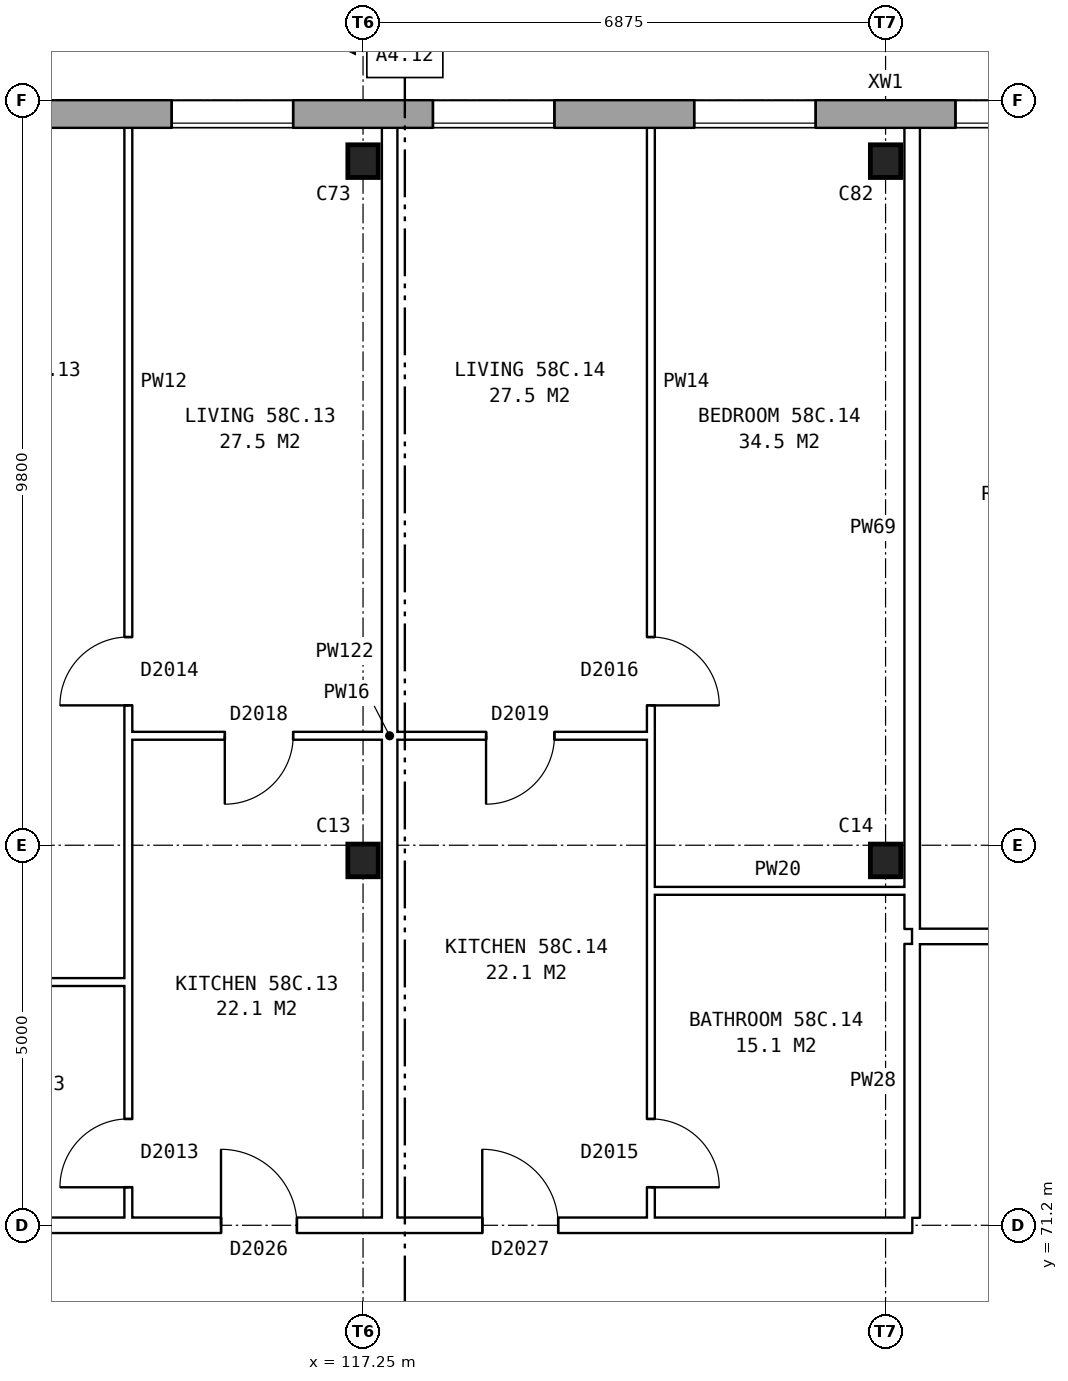
"""IFC4 building model, lengths in metres.
Left out: names, types, materials, properties, quantities, classifications, styles, units other than length and angle.
Written with IfcOpenShell. Run it as: python <this file> out.ifc"""

import sys

from ifc_helpers import new_model, si_unit, direction, frame, frame_2d, origin, origin_2d, place, context, subcontext, project, spatial, rectangle, i_section, extrude, element, fill, save


model = new_model("IFC4")
c1 = context("Model", 3, precision=1e-05, world=origin(), true_north=direction((0.0, 1.0)))
c2 = subcontext(c1, "Body", "Model", "MODEL_VIEW")
j1 = project(units=[si_unit("LENGTHUNIT", "METRE"), si_unit("PLANEANGLEUNIT", "RADIAN")], contexts=[c1])
p1 = place(None, origin())
s1 = spatial("IfcSite", under=j1, at=p1, CompositionType="ELEMENT")
p2 = place(p1, origin())
s2 = spatial("IfcBuilding", under=s1, at=p2, CompositionType="ELEMENT")
p3 = place(p2, frame((0.0, 0.0, 205.9)))
s3 = spatial("IfcBuildingStorey", under=s2, at=p3, CompositionType="ELEMENT", Elevation=205.9)
for number, where, z_axis, x_axis in (
    (1, (117.25, 76.0, 0.0), (0.0, 0.0, 1.0), (1.0, 0.0, 0.0)),
    (2, (124.125, 76.0, 0.0), (0.0, 0.0, 1.0), (1.0, 0.0, 0.0)),
    (3, (117.25, 85.2, 0.0), (0.0, 0.0, 1.0), (1.0, 0.0, 0.0)),
    (4, (124.125, 85.2, 0.0), (0.0, 0.0, 1.0), (1.0, 0.0, 0.0)),
):
    element("IfcColumn", number, at=place(p3, frame(where, z_axis=z_axis, x_axis=x_axis)), inside=s3, PredefinedType="COLUMN", context=c2, shape_type="SweptSolid", body=[
        extrude(i_section(OverallWidth=0.4, OverallDepth=0.43, WebThickness=0.04, FlangeThickness=0.04, at=origin_2d()), origin(), (0.0, 0.0, 1.0), 2.85),
    ])
p4 = place(p3, frame((131.05, 85.82, 0.0), z_axis=(0.0, 0.0, 1.0), x_axis=(-1.0, 0.0, 0.0)))
e5 = element("IfcWall", 5, at=p4, inside=s3, PredefinedType="STANDARD", context=c2, shape_type="SweptSolid", body=[
    extrude(rectangle(XDim=55.1, YDim=0.36, at=frame_2d((27.55, 0.0))), origin(), (0.0, 0.0, 1.0), 2.85),
])
p5 = place(p4, frame((0.969, 0.0, 0.8)))
e6 = element("IfcOpeningElement", 6, at=p5, cuts=e5, PredefinedType="OPENING", context=c2, shape_type="SweptSolid", body=[
    extrude(rectangle(XDim=1.6, YDim=1.8, at=frame_2d((0.8, 0.9))), frame((0.0, 0.19, 0.0), z_axis=(0.0, -1.0, 0.0), x_axis=(1.0, 0.0, 0.0)), (0.0, 0.0, 1.0), 0.38),
])
p6 = place(p4, frame((4.406, 0.0, 0.8)))
e7 = element("IfcOpeningElement", 7, at=p6, cuts=e5, PredefinedType="OPENING", context=c2, shape_type="SweptSolid", body=[
    extrude(rectangle(XDim=1.6, YDim=1.8, at=frame_2d((0.8, 0.9))), frame((0.0, 0.19, 0.0), z_axis=(0.0, -1.0, 0.0), x_axis=(1.0, 0.0, 0.0)), (0.0, 0.0, 1.0), 0.38),
])
p7 = place(p4, frame((7.844, 0.0, 0.8)))
e8 = element("IfcOpeningElement", 8, at=p7, cuts=e5, PredefinedType="OPENING", context=c2, shape_type="SweptSolid", body=[
    extrude(rectangle(XDim=1.6, YDim=1.8, at=frame_2d((0.8, 0.9))), frame((0.0, 0.19, 0.0), z_axis=(0.0, -1.0, 0.0), x_axis=(1.0, 0.0, 0.0)), (0.0, 0.0, 1.0), 0.38),
])
p8 = place(p4, frame((11.281, 0.0, 0.8)))
e9 = element("IfcOpeningElement", 9, at=p8, cuts=e5, PredefinedType="OPENING", context=c2, shape_type="SweptSolid", body=[
    extrude(rectangle(XDim=1.6, YDim=1.8, at=frame_2d((0.8, 0.9))), frame((0.0, 0.19, 0.0), z_axis=(0.0, -1.0, 0.0), x_axis=(1.0, 0.0, 0.0)), (0.0, 0.0, 1.0), 0.38),
])
p9 = place(p4, frame((14.719, 0.0, 0.8)))
e10 = element("IfcOpeningElement", 10, at=p9, cuts=e5, PredefinedType="OPENING", context=c2, shape_type="SweptSolid", body=[
    extrude(rectangle(XDim=1.6, YDim=1.8, at=frame_2d((0.8, 0.9))), frame((0.0, 0.19, 0.0), z_axis=(0.0, -1.0, 0.0), x_axis=(1.0, 0.0, 0.0)), (0.0, 0.0, 1.0), 0.38),
])
p10 = place(p4, frame((18.156, 0.0, 0.8)))
e11 = element("IfcOpeningElement", 11, at=p10, cuts=e5, PredefinedType="OPENING", context=c2, shape_type="SweptSolid", body=[
    extrude(rectangle(XDim=1.6, YDim=1.8, at=frame_2d((0.8, 0.9))), frame((0.0, 0.19, 0.0), z_axis=(0.0, -1.0, 0.0), x_axis=(1.0, 0.0, 0.0)), (0.0, 0.0, 1.0), 0.38),
])
p11 = place(p4, frame((21.594, 0.0, 0.8)))
e12 = element("IfcOpeningElement", 12, at=p11, cuts=e5, PredefinedType="OPENING", context=c2, shape_type="SweptSolid", body=[
    extrude(rectangle(XDim=1.6, YDim=1.8, at=frame_2d((0.8, 0.9))), frame((0.0, 0.19, 0.0), z_axis=(0.0, -1.0, 0.0), x_axis=(1.0, 0.0, 0.0)), (0.0, 0.0, 1.0), 0.38),
])
p12 = place(p4, frame((25.031, 0.0, 0.8)))
e13 = element("IfcOpeningElement", 13, at=p12, cuts=e5, PredefinedType="OPENING", context=c2, shape_type="SweptSolid", body=[
    extrude(rectangle(XDim=1.6, YDim=1.8, at=frame_2d((0.8, 0.9))), frame((0.0, 0.19, 0.0), z_axis=(0.0, -1.0, 0.0), x_axis=(1.0, 0.0, 0.0)), (0.0, 0.0, 1.0), 0.38),
])
p13 = place(p4, frame((28.469, 0.0, 0.8)))
e14 = element("IfcOpeningElement", 14, at=p13, cuts=e5, PredefinedType="OPENING", context=c2, shape_type="SweptSolid", body=[
    extrude(rectangle(XDim=1.6, YDim=1.8, at=frame_2d((0.8, 0.9))), frame((0.0, 0.19, 0.0), z_axis=(0.0, -1.0, 0.0), x_axis=(1.0, 0.0, 0.0)), (0.0, 0.0, 1.0), 0.38),
])
p14 = place(p4, frame((31.906, 0.0, 0.8)))
e15 = element("IfcOpeningElement", 15, at=p14, cuts=e5, PredefinedType="OPENING", context=c2, shape_type="SweptSolid", body=[
    extrude(rectangle(XDim=1.6, YDim=1.8, at=frame_2d((0.8, 0.9))), frame((0.0, 0.19, 0.0), z_axis=(0.0, -1.0, 0.0), x_axis=(1.0, 0.0, 0.0)), (0.0, 0.0, 1.0), 0.38),
])
p15 = place(p4, frame((35.344, 0.0, 0.8)))
e16 = element("IfcOpeningElement", 16, at=p15, cuts=e5, PredefinedType="OPENING", context=c2, shape_type="SweptSolid", body=[
    extrude(rectangle(XDim=1.6, YDim=1.8, at=frame_2d((0.8, 0.9))), frame((0.0, 0.19, 0.0), z_axis=(0.0, -1.0, 0.0), x_axis=(1.0, 0.0, 0.0)), (0.0, 0.0, 1.0), 0.38),
])
p16 = place(p4, frame((38.781, 0.0, 0.8)))
e17 = element("IfcOpeningElement", 17, at=p16, cuts=e5, PredefinedType="OPENING", context=c2, shape_type="SweptSolid", body=[
    extrude(rectangle(XDim=1.6, YDim=1.8, at=frame_2d((0.8, 0.9))), frame((0.0, 0.19, 0.0), z_axis=(0.0, -1.0, 0.0), x_axis=(1.0, 0.0, 0.0)), (0.0, 0.0, 1.0), 0.38),
])
p17 = place(p4, frame((42.219, 0.0, 0.8)))
e18 = element("IfcOpeningElement", 18, at=p17, cuts=e5, PredefinedType="OPENING", context=c2, shape_type="SweptSolid", body=[
    extrude(rectangle(XDim=1.6, YDim=1.8, at=frame_2d((0.8, 0.9))), frame((0.0, 0.19, 0.0), z_axis=(0.0, -1.0, 0.0), x_axis=(1.0, 0.0, 0.0)), (0.0, 0.0, 1.0), 0.38),
])
p18 = place(p4, frame((45.656, 0.0, 0.8)))
e19 = element("IfcOpeningElement", 19, at=p18, cuts=e5, PredefinedType="OPENING", context=c2, shape_type="SweptSolid", body=[
    extrude(rectangle(XDim=1.6, YDim=1.8, at=frame_2d((0.8, 0.9))), frame((0.0, 0.19, 0.0), z_axis=(0.0, -1.0, 0.0), x_axis=(1.0, 0.0, 0.0)), (0.0, 0.0, 1.0), 0.38),
])
p19 = place(p4, frame((49.094, 0.0, 0.8)))
e20 = element("IfcOpeningElement", 20, at=p19, cuts=e5, PredefinedType="OPENING", context=c2, shape_type="SweptSolid", body=[
    extrude(rectangle(XDim=1.6, YDim=1.8, at=frame_2d((0.8, 0.9))), frame((0.0, 0.19, 0.0), z_axis=(0.0, -1.0, 0.0), x_axis=(1.0, 0.0, 0.0)), (0.0, 0.0, 1.0), 0.38),
])
p20 = place(p4, frame((52.531, 0.0, 0.8)))
e21 = element("IfcOpeningElement", 21, at=p20, cuts=e5, PredefinedType="OPENING", context=c2, shape_type="SweptSolid", body=[
    extrude(rectangle(XDim=1.6, YDim=1.8, at=frame_2d((0.8, 0.9))), frame((0.0, 0.19, 0.0), z_axis=(0.0, -1.0, 0.0), x_axis=(1.0, 0.0, 0.0)), (0.0, 0.0, 1.0), 0.38),
])
p21 = place(p3, frame((83.225, 71.2, 0.0), z_axis=(0.0, 0.0, 1.0), x_axis=(1.0, 0.0, 0.0)))
e22 = element("IfcWall", 22, at=p21, inside=s3, PredefinedType="PARTITIONING", context=c2, shape_type="SweptSolid", body=[
    extrude(rectangle(XDim=41.25, YDim=0.2, at=frame_2d((20.625, 0.0))), origin(), (0.0, 0.0, 1.0), 2.85),
])
p22 = place(p21, frame((4.656, 0.0, 0.0)))
e23 = element("IfcOpeningElement", 23, at=p22, cuts=e22, PredefinedType="OPENING", context=c2, shape_type="SweptSolid", body=[
    extrude(rectangle(XDim=1.0, YDim=2.1, at=frame_2d((0.5, 1.05))), frame((0.0, 0.11, 0.0), z_axis=(0.0, -1.0, 0.0), x_axis=(1.0, 0.0, 0.0)), (0.0, 0.0, 1.0), 0.22),
])
p23 = place(p21, frame((11.531, 0.0, 0.0)))
e24 = element("IfcOpeningElement", 24, at=p23, cuts=e22, PredefinedType="OPENING", context=c2, shape_type="SweptSolid", body=[
    extrude(rectangle(XDim=1.0, YDim=2.1, at=frame_2d((0.5, 1.05))), frame((0.0, 0.11, 0.0), z_axis=(0.0, -1.0, 0.0), x_axis=(1.0, 0.0, 0.0)), (0.0, 0.0, 1.0), 0.22),
])
p24 = place(p21, frame((21.844, 0.0, 0.0)))
e25 = element("IfcOpeningElement", 25, at=p24, cuts=e22, PredefinedType="OPENING", context=c2, shape_type="SweptSolid", body=[
    extrude(rectangle(XDim=1.0, YDim=2.1, at=frame_2d((0.5, 1.05))), frame((0.0, 0.11, 0.0), z_axis=(0.0, -1.0, 0.0), x_axis=(1.0, 0.0, 0.0)), (0.0, 0.0, 1.0), 0.22),
])
p25 = place(p21, frame((32.156, 0.0, 0.0)))
e26 = element("IfcOpeningElement", 26, at=p25, cuts=e22, PredefinedType="OPENING", context=c2, shape_type="SweptSolid", body=[
    extrude(rectangle(XDim=1.0, YDim=2.1, at=frame_2d((0.5, 1.05))), frame((0.0, 0.11, 0.0), z_axis=(0.0, -1.0, 0.0), x_axis=(1.0, 0.0, 0.0)), (0.0, 0.0, 1.0), 0.22),
])
p26 = place(p21, frame((35.594, 0.0, 0.0)))
e27 = element("IfcOpeningElement", 27, at=p26, cuts=e22, PredefinedType="OPENING", context=c2, shape_type="SweptSolid", body=[
    extrude(rectangle(XDim=1.0, YDim=2.1, at=frame_2d((0.5, 1.05))), frame((0.0, 0.11, 0.0), z_axis=(0.0, -1.0, 0.0), x_axis=(1.0, 0.0, 0.0)), (0.0, 0.0, 1.0), 0.22),
])
p27 = place(p3, frame((110.825, 74.4, 0.0), z_axis=(0.0, 0.0, 1.0), x_axis=(1.0, 0.0, 0.0)))
e28 = element("IfcWall", 28, at=p27, inside=s3, PredefinedType="PARTITIONING", context=c2, shape_type="SweptSolid", body=[
    extrude(rectangle(XDim=3.337, YDim=0.1, at=frame_2d((1.668, 0.0))), origin(), (0.0, 0.0, 1.0), 2.85),
])
p28 = place(p3, frame((124.475, 75.0, 0.0), z_axis=(0.0, 0.0, 1.0), x_axis=(1.0, 0.0, 0.0)))
e29 = element("IfcWall", 29, at=p28, inside=s3, PredefinedType="PARTITIONING", context=c2, shape_type="SweptSolid", body=[
    extrude(rectangle(XDim=6.885, YDim=0.2, at=frame_2d((3.442, 0.0))), origin(), (0.0, 0.0, 1.0), 2.85),
])
p29 = place(p28, frame((2.992, 0.0, 0.0)))
e30 = element("IfcOpeningElement", 30, at=p29, cuts=e29, PredefinedType="OPENING", context=c2, shape_type="SweptSolid", body=[
    extrude(rectangle(XDim=0.9, YDim=2.1, at=frame_2d((0.45, 1.05))), frame((0.0, 0.11, 0.0), z_axis=(0.0, -1.0, 0.0), x_axis=(1.0, 0.0, 0.0)), (0.0, 0.0, 1.0), 0.22),
])
p30 = place(p3, frame((121.037, 75.6, 0.0), z_axis=(0.0, 0.0, 1.0), x_axis=(1.0, 0.0, 0.0)))
e31 = element("IfcWall", 31, at=p30, inside=s3, PredefinedType="PARTITIONING", context=c2, shape_type="SweptSolid", body=[
    extrude(rectangle(XDim=3.338, YDim=0.1, at=frame_2d((1.669, 0.0))), origin(), (0.0, 0.0, 1.0), 2.85),
])
p31 = place(p3, frame((114.162, 77.64, 0.0), z_axis=(0.0, 0.0, 1.0), x_axis=(1.0, 0.0, 0.0)))
e32 = element("IfcWall", 32, at=p31, inside=s3, PredefinedType="PARTITIONING", context=c2, shape_type="SweptSolid", body=[
    extrude(rectangle(XDim=6.875, YDim=0.1, at=frame_2d((3.438, 0.0))), origin(), (0.0, 0.0, 1.0), 2.85),
])
p32 = place(p31, frame((1.269, 0.0, 0.0)))
e33 = element("IfcOpeningElement", 33, at=p32, cuts=e32, PredefinedType="OPENING", context=c2, shape_type="SweptSolid", body=[
    extrude(rectangle(XDim=0.9, YDim=2.1, at=frame_2d((0.45, 1.05))), frame((0.0, 0.06, 0.0), z_axis=(0.0, -1.0, 0.0), x_axis=(1.0, 0.0, 0.0)), (0.0, 0.0, 1.0), 0.12),
])
p33 = place(p31, frame((4.707, 0.0, 0.0)))
e34 = element("IfcOpeningElement", 34, at=p33, cuts=e32, PredefinedType="OPENING", context=c2, shape_type="SweptSolid", body=[
    extrude(rectangle(XDim=0.9, YDim=2.1, at=frame_2d((0.45, 1.05))), frame((0.0, 0.06, 0.0), z_axis=(0.0, -1.0, 0.0), x_axis=(1.0, 0.0, 0.0)), (0.0, 0.0, 1.0), 0.12),
])
p34 = place(p3, frame((114.162, 71.3, 0.0), z_axis=(0.0, 0.0, 1.0), x_axis=(0.0, 1.0, 0.0)))
e35 = element("IfcWall", 35, at=p34, inside=s3, PredefinedType="PARTITIONING", context=c2, shape_type="SweptSolid", body=[
    extrude(rectangle(XDim=14.34, YDim=0.1, at=frame_2d((7.17, 0.0))), origin(), (0.0, 0.0, 1.0), 2.85),
])
p35 = place(p34, frame((6.74, 0.0, 0.0)))
e36 = element("IfcOpeningElement", 36, at=p35, cuts=e35, PredefinedType="OPENING", context=c2, shape_type="SweptSolid", body=[
    extrude(rectangle(XDim=0.9, YDim=2.1, at=frame_2d((0.45, 1.05))), frame((0.0, 0.06, 0.0), z_axis=(0.0, -1.0, 0.0), x_axis=(1.0, 0.0, 0.0)), (0.0, 0.0, 1.0), 0.12),
])
p36 = place(p34, frame((0.4, 0.0, 0.0)))
e37 = element("IfcOpeningElement", 37, at=p36, cuts=e35, PredefinedType="OPENING", context=c2, shape_type="SweptSolid", body=[
    extrude(rectangle(XDim=0.9, YDim=2.1, at=frame_2d((0.45, 1.05))), frame((0.0, 0.06, 0.0), z_axis=(0.0, -1.0, 0.0), x_axis=(1.0, 0.0, 0.0)), (0.0, 0.0, 1.0), 0.12),
])
p37 = place(p3, frame((117.6, 71.3, 0.0), z_axis=(0.0, 0.0, 1.0), x_axis=(0.0, 1.0, 0.0)))
e38 = element("IfcWall", 38, at=p37, inside=s3, PredefinedType="PARTITIONING", context=c2, shape_type="SweptSolid", body=[
    extrude(rectangle(XDim=14.34, YDim=0.2, at=frame_2d((7.17, 0.0))), origin(), (0.0, 0.0, 1.0), 2.85),
])
p38 = place(p3, frame((121.037, 71.3, 0.0), z_axis=(0.0, 0.0, 1.0), x_axis=(0.0, 1.0, 0.0)))
e39 = element("IfcWall", 39, at=p38, inside=s3, PredefinedType="PARTITIONING", context=c2, shape_type="SweptSolid", body=[
    extrude(rectangle(XDim=14.34, YDim=0.1, at=frame_2d((7.17, 0.0))), origin(), (0.0, 0.0, 1.0), 2.85),
])
p39 = place(p38, frame((6.74, 0.0, 0.0)))
e40 = element("IfcOpeningElement", 40, at=p39, cuts=e39, PredefinedType="OPENING", context=c2, shape_type="SweptSolid", body=[
    extrude(rectangle(XDim=0.9, YDim=2.1, at=frame_2d((0.45, 1.05))), frame((0.0, 0.06, 0.0), z_axis=(0.0, -1.0, 0.0), x_axis=(1.0, 0.0, 0.0)), (0.0, 0.0, 1.0), 0.12),
])
p40 = place(p38, frame((0.4, 0.0, 0.0)))
e41 = element("IfcOpeningElement", 41, at=p40, cuts=e39, PredefinedType="OPENING", context=c2, shape_type="SweptSolid", body=[
    extrude(rectangle(XDim=0.9, YDim=2.1, at=frame_2d((0.45, 1.05))), frame((0.0, 0.06, 0.0), z_axis=(0.0, -1.0, 0.0), x_axis=(1.0, 0.0, 0.0)), (0.0, 0.0, 1.0), 0.12),
])
p41 = place(p3, frame((124.475, 71.3, 0.0), z_axis=(0.0, 0.0, 1.0), x_axis=(0.0, 1.0, 0.0)))
e42 = element("IfcWall", 42, at=p41, inside=s3, PredefinedType="PARTITIONING", context=c2, shape_type="SweptSolid", body=[
    extrude(rectangle(XDim=3.6, YDim=0.2, at=frame_2d((1.8, 0.0))), origin(), (0.0, 0.0, 1.0), 2.85),
])
p42 = place(p3, frame((124.475, 75.1, 0.0), z_axis=(0.0, 0.0, 1.0), x_axis=(0.0, 1.0, 0.0)))
e43 = element("IfcWall", 43, at=p42, inside=s3, PredefinedType="PARTITIONING", context=c2, shape_type="SweptSolid", body=[
    extrude(rectangle(XDim=10.54, YDim=0.2, at=frame_2d((5.27, 0.0))), origin(), (0.0, 0.0, 1.0), 2.85),
])
p43 = place(p6, origin())
e44 = element("IfcWindow", 44, at=p43, inside=s3, PartitioningType="SINGLE_PANEL", PredefinedType="WINDOW", context=c2, shape_type="SweptSolid", body=[
    extrude(rectangle(XDim=1.6, YDim=1.8, at=frame_2d((0.8, 0.9))), frame((0.0, 0.15, 0.0), z_axis=(0.0, -1.0, 0.0), x_axis=(1.0, 0.0, 0.0)), (0.0, 0.0, 1.0), 0.06),
])
fill(e7, e44)
p44 = place(p7, origin())
e45 = element("IfcWindow", 45, at=p44, inside=s3, PartitioningType="SINGLE_PANEL", PredefinedType="WINDOW", context=c2, shape_type="SweptSolid", body=[
    extrude(rectangle(XDim=1.6, YDim=1.8, at=frame_2d((0.8, 0.9))), frame((0.0, 0.15, 0.0), z_axis=(0.0, -1.0, 0.0), x_axis=(1.0, 0.0, 0.0)), (0.0, 0.0, 1.0), 0.06),
])
fill(e8, e45)
p45 = place(p8, origin())
e46 = element("IfcWindow", 46, at=p45, inside=s3, PartitioningType="SINGLE_PANEL", PredefinedType="WINDOW", context=c2, shape_type="SweptSolid", body=[
    extrude(rectangle(XDim=1.6, YDim=1.8, at=frame_2d((0.8, 0.9))), frame((0.0, 0.15, 0.0), z_axis=(0.0, -1.0, 0.0), x_axis=(1.0, 0.0, 0.0)), (0.0, 0.0, 1.0), 0.06),
])
fill(e9, e46)
p46 = place(p9, origin())
e47 = element("IfcWindow", 47, at=p46, inside=s3, PartitioningType="SINGLE_PANEL", PredefinedType="WINDOW", context=c2, shape_type="SweptSolid", body=[
    extrude(rectangle(XDim=1.6, YDim=1.8, at=frame_2d((0.8, 0.9))), frame((0.0, 0.15, 0.0), z_axis=(0.0, -1.0, 0.0), x_axis=(1.0, 0.0, 0.0)), (0.0, 0.0, 1.0), 0.06),
])
fill(e10, e47)
p47 = place(p35, origin())
e48 = element("IfcDoor", 48, at=p47, inside=s3, OperationType="SINGLE_SWING_LEFT", PredefinedType="DOOR", context=c2, shape_type="SweptSolid", body=[
    extrude(rectangle(XDim=0.9, YDim=2.1, at=frame_2d((0.45, 1.05))), frame((0.0, 0.025, 0.0), z_axis=(0.0, -1.0, 0.0), x_axis=(1.0, 0.0, 0.0)), (0.0, 0.0, 1.0), 0.05),
])
fill(e36, e48)
p48 = place(p25, origin())
e49 = element("IfcDoor", 49, at=p48, inside=s3, OperationType="SINGLE_SWING_LEFT", PredefinedType="DOOR", context=c2, shape_type="SweptSolid", body=[
    extrude(rectangle(XDim=1.0, YDim=2.1, at=frame_2d((0.5, 1.05))), frame((0.0, 0.025, 0.0), z_axis=(0.0, -1.0, 0.0), x_axis=(1.0, 0.0, 0.0)), (0.0, 0.0, 1.0), 0.05),
])
fill(e26, e49)
p49 = place(p32, frame((0.9, 0.0, 0.0), z_axis=(0.0, 0.0, 1.0), x_axis=(-1.0, 0.0, 0.0)))
e50 = element("IfcDoor", 50, at=p49, inside=s3, OperationType="SINGLE_SWING_RIGHT", PredefinedType="DOOR", context=c2, shape_type="SweptSolid", body=[
    extrude(rectangle(XDim=0.9, YDim=2.1, at=frame_2d((0.45, 1.05))), frame((0.0, 0.025, 0.0), z_axis=(0.0, -1.0, 0.0), x_axis=(1.0, 0.0, 0.0)), (0.0, 0.0, 1.0), 0.05),
])
fill(e33, e50)
p50 = place(p36, origin())
e51 = element("IfcDoor", 51, at=p50, inside=s3, OperationType="SINGLE_SWING_LEFT", PredefinedType="DOOR", context=c2, shape_type="SweptSolid", body=[
    extrude(rectangle(XDim=0.9, YDim=2.1, at=frame_2d((0.45, 1.05))), frame((0.0, 0.025, 0.0), z_axis=(0.0, -1.0, 0.0), x_axis=(1.0, 0.0, 0.0)), (0.0, 0.0, 1.0), 0.05),
])
fill(e37, e51)
p51 = place(p39, frame((0.9, 0.0, 0.0), z_axis=(0.0, 0.0, 1.0), x_axis=(-1.0, 0.0, 0.0)))
e52 = element("IfcDoor", 52, at=p51, inside=s3, OperationType="SINGLE_SWING_RIGHT", PredefinedType="DOOR", context=c2, shape_type="SweptSolid", body=[
    extrude(rectangle(XDim=0.9, YDim=2.1, at=frame_2d((0.45, 1.05))), frame((0.0, 0.025, 0.0), z_axis=(0.0, -1.0, 0.0), x_axis=(1.0, 0.0, 0.0)), (0.0, 0.0, 1.0), 0.05),
])
fill(e40, e52)
p52 = place(p26, origin())
e53 = element("IfcDoor", 53, at=p52, inside=s3, OperationType="SINGLE_SWING_LEFT", PredefinedType="DOOR", context=c2, shape_type="SweptSolid", body=[
    extrude(rectangle(XDim=1.0, YDim=2.1, at=frame_2d((0.5, 1.05))), frame((0.0, 0.025, 0.0), z_axis=(0.0, -1.0, 0.0), x_axis=(1.0, 0.0, 0.0)), (0.0, 0.0, 1.0), 0.05),
])
fill(e27, e53)
p53 = place(p33, frame((0.9, 0.0, 0.0), z_axis=(0.0, 0.0, 1.0), x_axis=(-1.0, 0.0, 0.0)))
e54 = element("IfcDoor", 54, at=p53, inside=s3, OperationType="SINGLE_SWING_RIGHT", PredefinedType="DOOR", context=c2, shape_type="SweptSolid", body=[
    extrude(rectangle(XDim=0.9, YDim=2.1, at=frame_2d((0.45, 1.05))), frame((0.0, 0.025, 0.0), z_axis=(0.0, -1.0, 0.0), x_axis=(1.0, 0.0, 0.0)), (0.0, 0.0, 1.0), 0.05),
])
fill(e34, e54)
p54 = place(p40, frame((0.9, 0.0, 0.0), z_axis=(0.0, 0.0, 1.0), x_axis=(-1.0, 0.0, 0.0)))
e55 = element("IfcDoor", 55, at=p54, inside=s3, OperationType="SINGLE_SWING_RIGHT", PredefinedType="DOOR", context=c2, shape_type="SweptSolid", body=[
    extrude(rectangle(XDim=0.9, YDim=2.1, at=frame_2d((0.45, 1.05))), frame((0.0, 0.025, 0.0), z_axis=(0.0, -1.0, 0.0), x_axis=(1.0, 0.0, 0.0)), (0.0, 0.0, 1.0), 0.05),
])
fill(e41, e55)
save(model, sys.argv[1])
